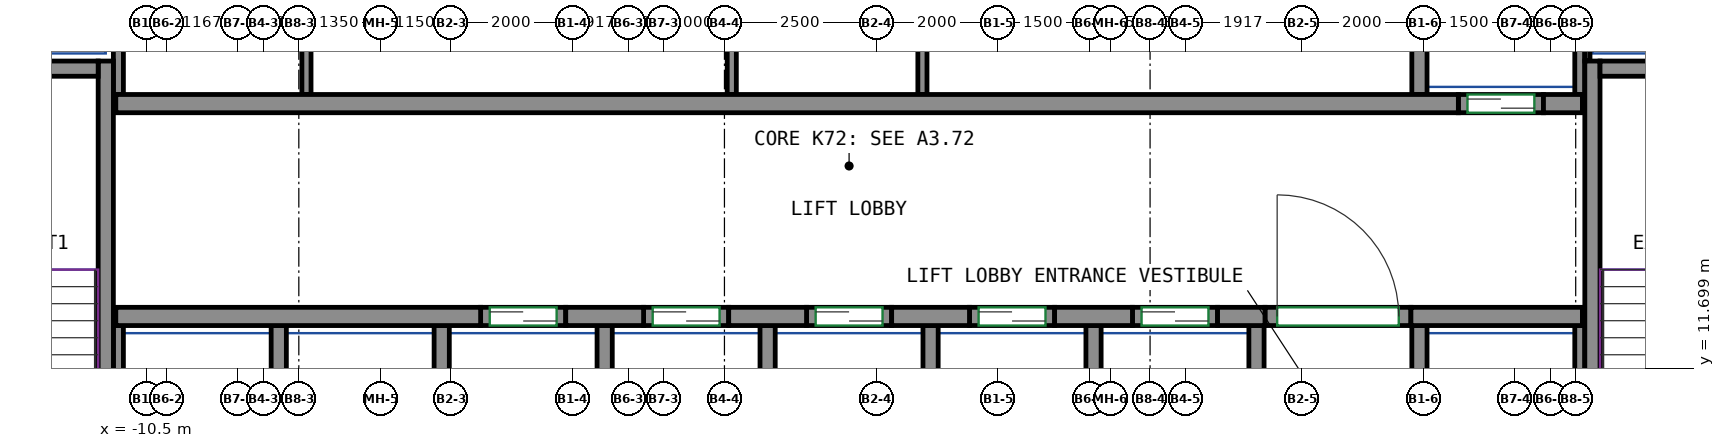
"""IFC4 building model, lengths in metres.
Left out: names, types, materials, properties, quantities, classifications, styles, units other than length and angle.
Written with IfcOpenShell. Run it as: python <this file> out.ifc"""

import sys

from ifc_helpers import new_model, si_unit, direction, frame, frame_2d, origin, place, context, subcontext, project, spatial, rectangle, extrude, source, transform, mapped, element, fill, save


model = new_model("IFC4")
c1 = context("Model", 3, precision=1e-05, world=origin(), true_north=direction((0.0, 1.0)))
c2 = subcontext(c1, "Body", "Model", "MODEL_VIEW")
j1 = project(units=[si_unit("LENGTHUNIT", "METRE"), si_unit("PLANEANGLEUNIT", "RADIAN")], contexts=[c1])
p1 = place(None, origin())
s1 = spatial("IfcSite", under=j1, at=p1, CompositionType="ELEMENT")
p2 = place(p1, origin())
s2 = spatial("IfcBuilding", under=s1, at=p2, CompositionType="ELEMENT")
p3 = place(p2, frame((0.0, 0.0, 287.4)))
s3 = spatial("IfcBuildingStorey", under=s2, at=p3, CompositionType="ELEMENT", Elevation=287.4)
m1 = source(origin(), c2, "Body", "SweptSolid", [
    extrude(rectangle(XDim=7.75, YDim=0.25, at=frame_2d((3.875, 0.0))), origin(), (0.0, 0.0, 1.0), 3.0),
])
p4 = place(p3, frame((-11.175, 9.0, 0.0), z_axis=(0.0, 0.0, 1.0), x_axis=(0.0, 1.0, 0.0)))
e1 = element("IfcWall", 1, at=p4, inside=s3, PredefinedType="SHEAR", context=c2, shape_type="MappedRepresentation", body=[
    mapped(m1, transform((0.0, 0.0, 0.0))),
])
m2 = source(origin(), c2, "Body", "SweptSolid", [
    extrude(rectangle(XDim=3.7, YDim=0.25, at=frame_2d((1.85, 0.0))), origin(), (0.0, 0.0, 1.0), 3.0),
])
p5 = place(p3, frame((-15.0, 16.625, 0.0), z_axis=(0.0, 0.0, 1.0), x_axis=(1.0, 0.0, 0.0)))
e2 = element("IfcWall", 2, at=p5, inside=s3, PredefinedType="SHEAR", context=c2, shape_type="MappedRepresentation", body=[
    mapped(m2, transform((0.0, 0.0, 0.0))),
])
p6 = place(p3, frame((13.275, 9.0, 0.0), z_axis=(0.0, 0.0, 1.0), x_axis=(0.0, 1.0, 0.0)))
e3 = element("IfcWall", 3, at=p6, inside=s3, PredefinedType="SHEAR", context=c2, shape_type="MappedRepresentation", body=[
    mapped(m1, transform((0.0, 0.0, 0.0))),
])
m3 = source(origin(), c2, "Body", "SweptSolid", [
    extrude(rectangle(XDim=3.7, YDim=0.25, at=frame_2d((1.85, 0.0))), origin(), (0.0, 0.0, 1.0), 3.0),
])
p7 = place(p3, frame((13.4, 16.625, 0.0), z_axis=(0.0, 0.0, 1.0), x_axis=(1.0, 0.0, 0.0)))
e4 = element("IfcWall", 4, at=p7, inside=s3, PredefinedType="SHEAR", context=c2, shape_type="MappedRepresentation", body=[
    mapped(m3, transform((0.0, 0.0, 0.0))),
])
m4 = source(origin(), c2, "Body", "SweptSolid", [
    extrude(rectangle(XDim=6.0, YDim=0.3, at=frame_2d((3.0, 0.0))), origin(), (0.0, 0.0, 1.0), 3.0),
])
p8 = place(p3, frame((-11.01, 12.55, 0.0), z_axis=(0.0, 0.0, 1.0), x_axis=(1.0, 0.0, 0.0)))
e5 = element("IfcWall", 5, at=p8, inside=s3, PredefinedType="SHEAR", context=c2, shape_type="MappedRepresentation", body=[
    mapped(m4, transform((0.0, 0.0, 0.0))),
])
m5 = source(origin(), c2, "Body", "SweptSolid", [
    extrude(rectangle(XDim=1.28, YDim=0.3, at=frame_2d((0.64, 0.0))), origin(), (0.0, 0.0, 1.0), 3.0),
])
for number, where, z_axis, x_axis in (
    (6, (-3.61, 12.55, 0.0), (0.0, 0.0, 1.0), (1.0, 0.0, 0.0)),
    (7, (-0.93, 12.55, 0.0), (0.0, 0.0, 1.0), (1.0, 0.0, 0.0)),
    (8, (1.75, 12.55, 0.0), (0.0, 0.0, 1.0), (1.0, 0.0, 0.0)),
    (9, (4.43, 12.55, 0.0), (0.0, 0.0, 1.0), (1.0, 0.0, 0.0)),
):
    element("IfcWall", number, at=place(p3, frame(where, z_axis=z_axis, x_axis=x_axis)), inside=s3, PredefinedType="SHEAR", context=c2, shape_type="MappedRepresentation", body=[
        mapped(m5, transform((0.0, 0.0, 0.0))),
    ])
m6 = source(origin(), c2, "Body", "SweptSolid", [
    extrude(rectangle(XDim=0.78, YDim=0.3, at=frame_2d((0.39, 0.0))), origin(), (0.0, 0.0, 1.0), 3.0),
])
p9 = place(p3, frame((7.11, 12.55, 0.0), z_axis=(0.0, 0.0, 1.0), x_axis=(1.0, 0.0, 0.0)))
e10 = element("IfcWall", 10, at=p9, inside=s3, PredefinedType="SHEAR", context=c2, shape_type="MappedRepresentation", body=[
    mapped(m6, transform((0.0, 0.0, 0.0))),
])
m7 = source(origin(), c2, "Body", "SweptSolid", [
    extrude(rectangle(XDim=2.82, YDim=0.3, at=frame_2d((1.41, 0.0))), origin(), (0.0, 0.0, 1.0), 3.0),
])
p10 = place(p3, frame((10.29, 12.55, 0.0), z_axis=(0.0, 0.0, 1.0), x_axis=(1.0, 0.0, 0.0)))
e11 = element("IfcWall", 11, at=p10, inside=s3, PredefinedType="SHEAR", context=c2, shape_type="MappedRepresentation", body=[
    mapped(m7, transform((0.0, 0.0, 0.0))),
])
m8 = source(origin(), c2, "Body", "SweptSolid", [
    extrude(rectangle(XDim=22.08, YDim=0.3, at=frame_2d((11.04, 0.0))), origin(), (0.0, 0.0, 1.0), 3.0),
])
p11 = place(p3, frame((-11.01, 16.05, 0.0), z_axis=(0.0, 0.0, 1.0), x_axis=(1.0, 0.0, 0.0)))
e12 = element("IfcWall", 12, at=p11, inside=s3, PredefinedType="SHEAR", context=c2, shape_type="MappedRepresentation", body=[
    mapped(m8, transform((0.0, 0.0, 0.0))),
])
m9 = source(origin(), c2, "Body", "SweptSolid", [
    extrude(rectangle(XDim=0.64, YDim=0.3, at=frame_2d((0.32, 0.0))), origin(), (0.0, 0.0, 1.0), 3.0),
])
p12 = place(p3, frame((12.47, 16.05, 0.0), z_axis=(0.0, 0.0, 1.0), x_axis=(1.0, 0.0, 0.0)))
e13 = element("IfcWall", 13, at=p12, inside=s3, PredefinedType="SHEAR", context=c2, shape_type="MappedRepresentation", body=[
    mapped(m9, transform((0.0, 0.0, 0.0))),
])
m10 = source(origin(), c2, "Body", "SweptSolid", [
    extrude(rectangle(XDim=1.4, YDim=0.3, at=frame_2d((0.7, 0.0))), origin(), (0.0, 0.0, 1.0), 3.0),
])
p13 = place(p3, frame((-5.01, 12.55, 0.0), z_axis=(0.0, 0.0, 1.0), x_axis=(1.0, 0.0, 0.0)))
e14 = element("IfcWall", 14, at=p13, inside=s3, PredefinedType="PARTITIONING", context=c2, shape_type="MappedRepresentation", body=[
    mapped(m10, transform((0.0, 0.0, 0.0))),
])
p14 = place(p13, frame((0.15, 0.0, 0.0)))
e15 = element("IfcOpeningElement", 15, at=p14, cuts=e14, PredefinedType="OPENING", context=c2, shape_type="SweptSolid", body=[
    extrude(rectangle(XDim=1.1, YDim=2.1, at=frame_2d((0.55, 1.05))), frame((0.0, 0.16, 0.0), z_axis=(0.0, -1.0, 0.0), x_axis=(1.0, 0.0, 0.0)), (0.0, 0.0, 1.0), 0.32),
])
m11 = source(origin(), c2, "Body", "SweptSolid", [
    extrude(rectangle(XDim=1.4, YDim=0.3, at=frame_2d((0.7, 0.0))), origin(), (0.0, 0.0, 1.0), 3.0),
])
p15 = place(p3, frame((-2.33, 12.55, 0.0), z_axis=(0.0, 0.0, 1.0), x_axis=(1.0, 0.0, 0.0)))
e16 = element("IfcWall", 16, at=p15, inside=s3, PredefinedType="PARTITIONING", context=c2, shape_type="MappedRepresentation", body=[
    mapped(m11, transform((0.0, 0.0, 0.0))),
])
p16 = place(p15, frame((0.15, 0.0, 0.0)))
e17 = element("IfcOpeningElement", 17, at=p16, cuts=e16, PredefinedType="OPENING", context=c2, shape_type="SweptSolid", body=[
    extrude(rectangle(XDim=1.1, YDim=2.1, at=frame_2d((0.55, 1.05))), frame((0.0, 0.16, 0.0), z_axis=(0.0, -1.0, 0.0), x_axis=(1.0, 0.0, 0.0)), (0.0, 0.0, 1.0), 0.32),
])
p17 = place(p3, frame((0.35, 12.55, 0.0), z_axis=(0.0, 0.0, 1.0), x_axis=(1.0, 0.0, 0.0)))
e18 = element("IfcWall", 18, at=p17, inside=s3, PredefinedType="PARTITIONING", context=c2, shape_type="MappedRepresentation", body=[
    mapped(m10, transform((0.0, 0.0, 0.0))),
])
p18 = place(p17, frame((0.15, 0.0, 0.0)))
e19 = element("IfcOpeningElement", 19, at=p18, cuts=e18, PredefinedType="OPENING", context=c2, shape_type="SweptSolid", body=[
    extrude(rectangle(XDim=1.1, YDim=2.1, at=frame_2d((0.55, 1.05))), frame((0.0, 0.16, 0.0), z_axis=(0.0, -1.0, 0.0), x_axis=(1.0, 0.0, 0.0)), (0.0, 0.0, 1.0), 0.32),
])
p19 = place(p3, frame((3.03, 12.55, 0.0), z_axis=(0.0, 0.0, 1.0), x_axis=(1.0, 0.0, 0.0)))
e20 = element("IfcWall", 20, at=p19, inside=s3, PredefinedType="PARTITIONING", context=c2, shape_type="MappedRepresentation", body=[
    mapped(m10, transform((0.0, 0.0, 0.0))),
])
p20 = place(p19, frame((0.15, 0.0, 0.0)))
e21 = element("IfcOpeningElement", 21, at=p20, cuts=e20, PredefinedType="OPENING", context=c2, shape_type="SweptSolid", body=[
    extrude(rectangle(XDim=1.1, YDim=2.1, at=frame_2d((0.55, 1.05))), frame((0.0, 0.16, 0.0), z_axis=(0.0, -1.0, 0.0), x_axis=(1.0, 0.0, 0.0)), (0.0, 0.0, 1.0), 0.32),
])
p21 = place(p3, frame((5.71, 12.55, 0.0), z_axis=(0.0, 0.0, 1.0), x_axis=(1.0, 0.0, 0.0)))
e22 = element("IfcWall", 22, at=p21, inside=s3, PredefinedType="PARTITIONING", context=c2, shape_type="MappedRepresentation", body=[
    mapped(m11, transform((0.0, 0.0, 0.0))),
])
p22 = place(p21, frame((0.15, 0.0, 0.0)))
e23 = element("IfcOpeningElement", 23, at=p22, cuts=e22, PredefinedType="OPENING", context=c2, shape_type="SweptSolid", body=[
    extrude(rectangle(XDim=1.1, YDim=2.1, at=frame_2d((0.55, 1.05))), frame((0.0, 0.16, 0.0), z_axis=(0.0, -1.0, 0.0), x_axis=(1.0, 0.0, 0.0)), (0.0, 0.0, 1.0), 0.32),
])
p23 = place(p3, frame((11.07, 16.05, 0.0), z_axis=(0.0, 0.0, 1.0), x_axis=(1.0, 0.0, 0.0)))
e24 = element("IfcWall", 24, at=p23, inside=s3, PredefinedType="PARTITIONING", context=c2, shape_type="MappedRepresentation", body=[
    mapped(m10, transform((0.0, 0.0, 0.0))),
])
p24 = place(p23, frame((0.15, 0.0, 0.0)))
e25 = element("IfcOpeningElement", 25, at=p24, cuts=e24, PredefinedType="OPENING", context=c2, shape_type="SweptSolid", body=[
    extrude(rectangle(XDim=1.1, YDim=2.1, at=frame_2d((0.55, 1.05))), frame((0.0, 0.16, 0.0), z_axis=(0.0, -1.0, 0.0), x_axis=(1.0, 0.0, 0.0)), (0.0, 0.0, 1.0), 0.32),
])
m12 = source(origin(), c2, "Body", "SweptSolid", [
    extrude(rectangle(XDim=2.4, YDim=0.3, at=frame_2d((1.2, 0.0))), origin(), (0.0, 0.0, 1.0), 3.0),
])
p25 = place(p3, frame((7.89, 12.55, 0.0), z_axis=(0.0, 0.0, 1.0), x_axis=(1.0, 0.0, 0.0)))
e26 = element("IfcWall", 26, at=p25, inside=s3, PredefinedType="PARTITIONING", context=c2, shape_type="MappedRepresentation", body=[
    mapped(m12, transform((0.0, 0.0, 0.0))),
])
p26 = place(p25, frame((0.2, 0.0, 0.0)))
e27 = element("IfcOpeningElement", 27, at=p26, cuts=e26, PredefinedType="OPENING", context=c2, shape_type="SweptSolid", body=[
    extrude(rectangle(XDim=2.0, YDim=2.1, at=frame_2d((1.0, 1.05))), frame((0.0, 0.16, 0.0), z_axis=(0.0, -1.0, 0.0), x_axis=(1.0, 0.0, 0.0)), (0.0, 0.0, 1.0), 0.32),
])
m13 = source(origin(), c2, "Body", "SweptSolid", [
    extrude(rectangle(XDim=3.275, YDim=0.165, at=frame_2d((1.638, 0.0))), origin(), (0.0, 0.0, 1.0), 3.0),
])
p27 = place(p3, frame((13.067, 16.2, 0.0), z_axis=(0.0, 0.0, 1.0), x_axis=(0.0, 1.0, 0.0)))
e28 = element("IfcWall", 28, at=p27, inside=s3, PredefinedType="PARTITIONING", context=c2, shape_type="MappedRepresentation", body=[
    mapped(m13, transform((0.0, 0.0, 0.0))),
])
m14 = source(origin(), c2, "Body", "SweptSolid", [
    extrude(rectangle(XDim=4.8, YDim=0.165, at=frame_2d((2.4, 0.0))), origin(), (0.0, 0.0, 1.0), 3.0),
])
p28 = place(p3, frame((-10.968, 16.2, 0.0), z_axis=(0.0, 0.0, 1.0), x_axis=(0.0, 1.0, 0.0)))
e29 = element("IfcWall", 29, at=p28, inside=s3, PredefinedType="PARTITIONING", context=c2, shape_type="MappedRepresentation", body=[
    mapped(m14, transform((0.0, 0.0, 0.0))),
])
m15 = source(origin(), c2, "Body", "SweptSolid", [
    extrude(rectangle(XDim=3.275, YDim=0.25, at=frame_2d((1.638, 0.0))), origin(), (0.0, 0.0, 1.0), 3.0),
])
p29 = place(p3, frame((10.43, 16.2, 0.0), z_axis=(0.0, 0.0, 1.0), x_axis=(0.0, 1.0, 0.0)))
e30 = element("IfcWall", 30, at=p29, inside=s3, PredefinedType="PARTITIONING", context=c2, shape_type="MappedRepresentation", body=[
    mapped(m15, transform((0.0, 0.0, 0.0))),
])
m16 = source(origin(), c2, "Body", "SweptSolid", [
    extrude(rectangle(XDim=2.725, YDim=0.085, at=frame_2d((1.363, 0.0))), origin(), (0.0, 0.0, 1.0), 3.0),
])
p30 = place(p3, frame((13.192, 16.75, 0.0), z_axis=(0.0, 0.0, 1.0), x_axis=(0.0, 1.0, 0.0)))
e31 = element("IfcWall", 31, at=p30, inside=s3, PredefinedType="PARTITIONING", context=c2, shape_type="MappedRepresentation", body=[
    mapped(m16, transform((0.0, 0.0, 0.0))),
])
m17 = source(origin(), c2, "Body", "SweptSolid", [
    extrude(rectangle(XDim=3.4, YDim=0.25, at=frame_2d((1.7, 0.0))), origin(), (0.0, 0.0, 1.0), 3.0),
])
p31 = place(p3, frame((10.43, 9.0, 0.0), z_axis=(0.0, 0.0, 1.0), x_axis=(0.0, 1.0, 0.0)))
e32 = element("IfcWall", 32, at=p31, inside=s3, PredefinedType="PARTITIONING", context=c2, shape_type="MappedRepresentation", body=[
    mapped(m17, transform((0.0, 0.0, 0.0))),
])
m18 = source(origin(), c2, "Body", "SweptSolid", [
    extrude(rectangle(XDim=3.4, YDim=0.165, at=frame_2d((1.7, 0.0))), origin(), (0.0, 0.0, 1.0), 3.0),
])
p32 = place(p3, frame((13.067, 9.0, 0.0), z_axis=(0.0, 0.0, 1.0), x_axis=(0.0, 1.0, 0.0)))
e33 = element("IfcWall", 33, at=p32, inside=s3, PredefinedType="PARTITIONING", context=c2, shape_type="MappedRepresentation", body=[
    mapped(m18, transform((0.0, 0.0, 0.0))),
])
for number, where, z_axis, x_axis in (
    (34, (2.39, 9.0, 0.0), (0.0, 0.0, 1.0), (0.0, 1.0, 0.0)),
    (35, (5.07, 9.0, 0.0), (0.0, 0.0, 1.0), (0.0, 1.0, 0.0)),
    (36, (7.75, 9.0, 0.0), (0.0, 0.0, 1.0), (0.0, 1.0, 0.0)),
    (37, (-0.29, 9.0, 0.0), (0.0, 0.0, 1.0), (0.0, 1.0, 0.0)),
):
    element("IfcWall", number, at=place(p3, frame(where, z_axis=z_axis, x_axis=x_axis)), inside=s3, PredefinedType="PARTITIONING", context=c2, shape_type="MappedRepresentation", body=[
        mapped(m17, transform((0.0, 0.0, 0.0))),
    ])
p33 = place(p3, frame((-10.968, 9.0, 0.0), z_axis=(0.0, 0.0, 1.0), x_axis=(0.0, 1.0, 0.0)))
e38 = element("IfcWall", 38, at=p33, inside=s3, PredefinedType="PARTITIONING", context=c2, shape_type="MappedRepresentation", body=[
    mapped(m18, transform((0.0, 0.0, 0.0))),
])
for number, where, z_axis, x_axis in (
    (39, (-2.97, 9.0, 0.0), (0.0, 0.0, 1.0), (0.0, 1.0, 0.0)),
    (40, (-5.65, 9.0, 0.0), (0.0, 0.0, 1.0), (0.0, 1.0, 0.0)),
    (41, (-8.33, 9.0, 0.0), (0.0, 0.0, 1.0), (0.0, 1.0, 0.0)),
):
    element("IfcWall", number, at=place(p3, frame(where, z_axis=z_axis, x_axis=x_axis)), inside=s3, PredefinedType="PARTITIONING", context=c2, shape_type="MappedRepresentation", body=[
        mapped(m17, transform((0.0, 0.0, 0.0))),
    ])
m19 = source(origin(), c2, "Body", "SweptSolid", [
    extrude(rectangle(XDim=4.8, YDim=0.15, at=frame_2d((2.4, 0.0))), origin(), (0.0, 0.0, 1.0), 3.0),
])
for number, where, z_axis, x_axis in (
    (42, (-7.875, 16.2, 0.0), (0.0, 0.0, 1.0), (0.0, 1.0, 0.0)),
    (43, (-0.88, 16.2, 0.0), (0.0, 0.0, 1.0), (0.0, 1.0, 0.0)),
    (44, (2.256, 16.2, 0.0), (0.0, 0.0, 1.0), (0.0, 1.0, 0.0)),
):
    element("IfcWall", number, at=place(p3, frame(where, z_axis=z_axis, x_axis=x_axis)), inside=s3, PredefinedType="PARTITIONING", context=c2, shape_type="MappedRepresentation", body=[
        mapped(m19, transform((0.0, 0.0, 0.0))),
    ])
p34 = place(p26, origin())
e45 = element("IfcDoor", 45, at=p34, inside=s3, OperationType="DOUBLE_DOOR_SINGLE_SWING", PredefinedType="DOOR", context=c2, shape_type="SweptSolid", body=[
    extrude(rectangle(XDim=2.0, YDim=2.1, at=frame_2d((1.0, 1.05))), frame((0.0, 0.025, 0.0), z_axis=(0.0, -1.0, 0.0), x_axis=(1.0, 0.0, 0.0)), (0.0, 0.0, 1.0), 0.05),
])
fill(e27, e45)
p35 = place(p14, origin())
e46 = element("IfcDoor", 46, at=p35, inside=s3, OperationType="DOUBLE_DOOR_SLIDING", PredefinedType="DOOR", context=c2, shape_type="SweptSolid", body=[
    extrude(rectangle(XDim=1.1, YDim=2.1, at=frame_2d((0.55, 1.05))), frame((0.0, 0.025, 0.0), z_axis=(0.0, -1.0, 0.0), x_axis=(1.0, 0.0, 0.0)), (0.0, 0.0, 1.0), 0.05),
])
fill(e15, e46)
p36 = place(p16, origin())
e47 = element("IfcDoor", 47, at=p36, inside=s3, OperationType="DOUBLE_DOOR_SLIDING", PredefinedType="DOOR", context=c2, shape_type="SweptSolid", body=[
    extrude(rectangle(XDim=1.1, YDim=2.1, at=frame_2d((0.55, 1.05))), frame((0.0, 0.025, 0.0), z_axis=(0.0, -1.0, 0.0), x_axis=(1.0, 0.0, 0.0)), (0.0, 0.0, 1.0), 0.05),
])
fill(e17, e47)
p37 = place(p18, origin())
e48 = element("IfcDoor", 48, at=p37, inside=s3, OperationType="DOUBLE_DOOR_SLIDING", PredefinedType="DOOR", context=c2, shape_type="SweptSolid", body=[
    extrude(rectangle(XDim=1.1, YDim=2.1, at=frame_2d((0.55, 1.05))), frame((0.0, 0.025, 0.0), z_axis=(0.0, -1.0, 0.0), x_axis=(1.0, 0.0, 0.0)), (0.0, 0.0, 1.0), 0.05),
])
fill(e19, e48)
p38 = place(p20, origin())
e49 = element("IfcDoor", 49, at=p38, inside=s3, OperationType="DOUBLE_DOOR_SLIDING", PredefinedType="DOOR", context=c2, shape_type="SweptSolid", body=[
    extrude(rectangle(XDim=1.1, YDim=2.1, at=frame_2d((0.55, 1.05))), frame((0.0, 0.025, 0.0), z_axis=(0.0, -1.0, 0.0), x_axis=(1.0, 0.0, 0.0)), (0.0, 0.0, 1.0), 0.05),
])
fill(e21, e49)
p39 = place(p22, origin())
e50 = element("IfcDoor", 50, at=p39, inside=s3, OperationType="DOUBLE_DOOR_SLIDING", PredefinedType="DOOR", context=c2, shape_type="SweptSolid", body=[
    extrude(rectangle(XDim=1.1, YDim=2.1, at=frame_2d((0.55, 1.05))), frame((0.0, 0.025, 0.0), z_axis=(0.0, -1.0, 0.0), x_axis=(1.0, 0.0, 0.0)), (0.0, 0.0, 1.0), 0.05),
])
fill(e23, e50)
p40 = place(p24, origin())
e51 = element("IfcDoor", 51, at=p40, inside=s3, OperationType="DOUBLE_DOOR_SLIDING", PredefinedType="DOOR", context=c2, shape_type="SweptSolid", body=[
    extrude(rectangle(XDim=1.1, YDim=2.1, at=frame_2d((0.55, 1.05))), frame((0.0, 0.025, 0.0), z_axis=(0.0, -1.0, 0.0), x_axis=(1.0, 0.0, 0.0)), (0.0, 0.0, 1.0), 0.05),
])
fill(e25, e51)
save(model, sys.argv[1])
